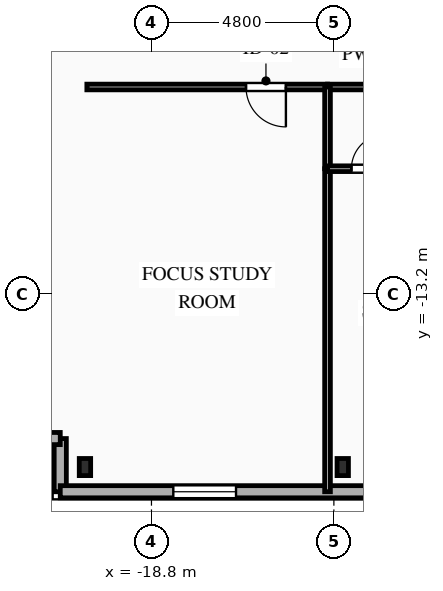
"""IFC4 building model, lengths in metres.
Left out: names, types, materials, properties, quantities, classifications, styles, units other than length and angle.
Written with IfcOpenShell. Run it as: python <this file> out.ifc"""

import sys

from ifc_helpers import new_model, si_unit, direction, frame, frame_2d, origin, origin_2d, place, context, subcontext, project, spatial, rectangle, i_section, extrude, element, fill, save


model = new_model("IFC4")
c1 = context("Model", 3, precision=1e-05, world=origin(), true_north=direction((0.0, 1.0)))
c2 = subcontext(c1, "Body", "Model", "MODEL_VIEW")
j1 = project(units=[si_unit("LENGTHUNIT", "METRE"), si_unit("PLANEANGLEUNIT", "RADIAN")], contexts=[c1])
p1 = place(None, origin())
s1 = spatial("IfcSite", under=j1, at=p1, CompositionType="ELEMENT")
p2 = place(p1, origin())
s2 = spatial("IfcBuilding", under=s1, at=p2, CompositionType="ELEMENT")
p3 = place(p2, frame((0.0, 0.0, 248.4)))
s3 = spatial("IfcBuildingStorey", under=s2, at=p3, CompositionType="ELEMENT", Elevation=248.4)
for number, where, z_axis, x_axis in (
    (1, (-20.55, -17.75, 0.0), (0.0, 0.0, 1.0), (1.0, 0.0, 0.0)),
    (2, (-13.767, -17.75, 0.0), (0.0, 0.0, 1.0), (1.0, 0.0, 0.0)),
):
    element("IfcColumn", number, at=place(p3, frame(where, z_axis=z_axis, x_axis=x_axis)), inside=s3, PredefinedType="COLUMN", context=c2, shape_type="SweptSolid", body=[
        extrude(i_section(OverallWidth=0.3, OverallDepth=0.45, WebThickness=0.014, FlangeThickness=0.026, FilletRadius=0.027, at=origin_2d()), origin(), (0.0, 0.0, 1.0), 3.35),
    ])
p4 = place(p3, frame((-21.2, -18.4, 0.0), z_axis=(0.0, 0.0, 1.0), x_axis=(0.0, 1.0, 0.0)))
e3 = element("IfcWall", 3, at=p4, inside=s3, PredefinedType="SOLIDWALL", context=c2, shape_type="SweptSolid", body=[
    extrude(rectangle(XDim=1.4, YDim=0.32, at=frame_2d((0.7, 0.0))), origin(), (0.0, 0.0, 1.0), 3.04),
])
p5 = place(p3, frame((-21.2, -17.0, 0.0), z_axis=(0.0, 0.0, 1.0), x_axis=(-1.0, 0.0, 0.0)))
e4 = element("IfcWall", 4, at=p5, inside=s3, PredefinedType="SOLIDWALL", context=c2, shape_type="SweptSolid", body=[
    extrude(rectangle(XDim=1.4, YDim=0.32, at=frame_2d((0.7, 0.0))), origin(), (0.0, 0.0, 1.0), 3.04),
])
p6 = place(p3, frame((20.8, -18.4, 0.0), z_axis=(0.0, 0.0, 1.0), x_axis=(-1.0, 0.0, 0.0)))
e5 = element("IfcWall", 5, at=p6, inside=s3, PredefinedType="SOLIDWALL", context=c2, shape_type="SweptSolid", body=[
    extrude(rectangle(XDim=42.0, YDim=0.32, at=frame_2d((21.0, 0.0))), origin(), (0.0, 0.0, 1.0), 3.04),
])
p7 = place(p6, frame((3.255, 0.0, 0.85)))
e6 = element("IfcOpeningElement", 6, at=p7, cuts=e5, PredefinedType="OPENING", context=c2, shape_type="SweptSolid", body=[
    extrude(rectangle(XDim=1.65, YDim=1.85, at=frame_2d((0.825, 0.925))), frame((0.0, 0.17, 0.0), z_axis=(0.0, -1.0, 0.0), x_axis=(1.0, 0.0, 0.0)), (0.0, 0.0, 1.0), 0.34),
])
p8 = place(p6, frame((9.98, 0.0, 0.85)))
e7 = element("IfcOpeningElement", 7, at=p8, cuts=e5, PredefinedType="OPENING", context=c2, shape_type="SweptSolid", body=[
    extrude(rectangle(XDim=2.2, YDim=1.85, at=frame_2d((1.1, 0.925))), frame((0.0, 0.17, 0.0), z_axis=(0.0, -1.0, 0.0), x_axis=(1.0, 0.0, 0.0)), (0.0, 0.0, 1.0), 0.34),
])
p9 = place(p6, frame((16.82, 0.0, 0.85)))
e8 = element("IfcOpeningElement", 8, at=p9, cuts=e5, PredefinedType="OPENING", context=c2, shape_type="SweptSolid", body=[
    extrude(rectangle(XDim=2.2, YDim=1.85, at=frame_2d((1.1, 0.925))), frame((0.0, 0.17, 0.0), z_axis=(0.0, -1.0, 0.0), x_axis=(1.0, 0.0, 0.0)), (0.0, 0.0, 1.0), 0.34),
])
p10 = place(p6, frame((23.66, 0.0, 0.85)))
e9 = element("IfcOpeningElement", 9, at=p10, cuts=e5, PredefinedType="OPENING", context=c2, shape_type="SweptSolid", body=[
    extrude(rectangle(XDim=2.2, YDim=1.85, at=frame_2d((1.1, 0.925))), frame((0.0, 0.17, 0.0), z_axis=(0.0, -1.0, 0.0), x_axis=(1.0, 0.0, 0.0)), (0.0, 0.0, 1.0), 0.34),
])
p11 = place(p6, frame((30.5, 0.0, 0.85)))
e10 = element("IfcOpeningElement", 10, at=p11, cuts=e5, PredefinedType="OPENING", context=c2, shape_type="SweptSolid", body=[
    extrude(rectangle(XDim=2.2, YDim=1.85, at=frame_2d((1.1, 0.925))), frame((0.0, 0.17, 0.0), z_axis=(0.0, -1.0, 0.0), x_axis=(1.0, 0.0, 0.0)), (0.0, 0.0, 1.0), 0.34),
])
p12 = place(p6, frame((37.375, 0.0, 0.85)))
e11 = element("IfcOpeningElement", 11, at=p12, cuts=e5, PredefinedType="OPENING", context=c2, shape_type="SweptSolid", body=[
    extrude(rectangle(XDim=1.65, YDim=1.85, at=frame_2d((0.825, 0.925))), frame((0.0, 0.17, 0.0), z_axis=(0.0, -1.0, 0.0), x_axis=(1.0, 0.0, 0.0)), (0.0, 0.0, 1.0), 0.34),
])
p13 = place(p3, frame((-14.167, -7.75, 0.0), z_axis=(0.0, 0.0, 1.0), x_axis=(-1.0, 0.0, 0.0)))
e12 = element("IfcWall", 12, at=p13, inside=s3, PredefinedType="PARTITIONING", context=c2, shape_type="SweptSolid", body=[
    extrude(rectangle(XDim=6.333, YDim=0.15, at=frame_2d((3.167, 0.0))), origin(), (0.0, 0.0, 1.0), 3.04),
])
p14 = place(p13, frame((1.095, 0.0, 0.0)))
e13 = element("IfcOpeningElement", 13, at=p14, cuts=e12, PredefinedType="OPENING", context=c2, shape_type="SweptSolid", body=[
    extrude(rectangle(XDim=1.05, YDim=2.15, at=frame_2d((0.525, 1.075))), frame((0.0, 0.085, 0.0), z_axis=(0.0, -1.0, 0.0), x_axis=(1.0, 0.0, 0.0)), (0.0, 0.0, 1.0), 0.17),
])
p15 = place(p3, frame((-11.717, -7.75, 0.0), z_axis=(0.0, 0.0, 1.0), x_axis=(-1.0, 0.0, 0.0)))
e14 = element("IfcWall", 14, at=p15, inside=s3, PredefinedType="PLUMBINGWALL", context=c2, shape_type="SweptSolid", body=[
    extrude(rectangle(XDim=2.45, YDim=0.15, at=frame_2d((1.225, 0.0))), origin(), (0.0, 0.0, 1.0), 3.04),
])
p16 = place(p3, frame((-14.167, -9.9, 0.0), z_axis=(0.0, 0.0, 1.0), x_axis=(0.0, -1.0, 0.0)))
e15 = element("IfcWall", 15, at=p16, inside=s3, PredefinedType="PARTITIONING", context=c2, shape_type="SweptSolid", body=[
    extrude(rectangle(XDim=8.5, YDim=0.15, at=frame_2d((4.25, 0.0))), origin(), (0.0, 0.0, 1.0), 3.04),
])
p17 = place(p3, frame((-14.167, -7.75, 0.0), z_axis=(0.0, 0.0, 1.0), x_axis=(0.0, -1.0, 0.0)))
e16 = element("IfcWall", 16, at=p17, inside=s3, PredefinedType="PLUMBINGWALL", context=c2, shape_type="SweptSolid", body=[
    extrude(rectangle(XDim=2.15, YDim=0.15, at=frame_2d((1.075, 0.0))), origin(), (0.0, 0.0, 1.0), 3.04),
])
p18 = place(p3, frame((-14.167, -9.9, 0.0), z_axis=(0.0, 0.0, 1.0), x_axis=(1.0, 0.0, 0.0)))
e17 = element("IfcWall", 17, at=p18, inside=s3, PredefinedType="PLUMBINGWALL", context=c2, shape_type="SweptSolid", body=[
    extrude(rectangle(XDim=2.45, YDim=0.15, at=frame_2d((1.225, 0.0))), origin(), (0.0, 0.0, 1.0), 3.04),
])
p19 = place(p18, frame((0.629, 0.0, 0.0)))
e18 = element("IfcOpeningElement", 18, at=p19, cuts=e17, PredefinedType="OPENING", context=c2, shape_type="SweptSolid", body=[
    extrude(rectangle(XDim=0.9, YDim=2.1, at=frame_2d((0.45, 1.05))), frame((0.0, 0.085, 0.0), z_axis=(0.0, -1.0, 0.0), x_axis=(1.0, 0.0, 0.0)), (0.0, 0.0, 1.0), 0.17),
])
p20 = place(p12, origin())
e19 = element("IfcWindow", 19, at=p20, inside=s3, PartitioningType="SINGLE_PANEL", PredefinedType="WINDOW", context=c2, shape_type="SweptSolid", body=[
    extrude(rectangle(XDim=1.65, YDim=1.85, at=frame_2d((0.825, 0.925))), frame((0.0, 0.03, 0.0), z_axis=(0.0, -1.0, 0.0), x_axis=(1.0, 0.0, 0.0)), (0.0, 0.0, 1.0), 0.06),
])
fill(e11, e19)
p21 = place(p14, origin())
e20 = element("IfcDoor", 20, at=p21, inside=s3, OperationType="SINGLE_SWING_LEFT", PredefinedType="DOOR", context=c2, shape_type="SweptSolid", body=[
    extrude(rectangle(XDim=1.05, YDim=2.15, at=frame_2d((0.525, 1.075))), frame((0.0, 0.025, 0.0), z_axis=(0.0, -1.0, 0.0), x_axis=(1.0, 0.0, 0.0)), (0.0, 0.0, 1.0), 0.05),
])
fill(e13, e20)
p22 = place(p19, origin())
e21 = element("IfcDoor", 21, at=p22, inside=s3, OperationType="SINGLE_SWING_RIGHT", PredefinedType="DOOR", context=c2, shape_type="SweptSolid", body=[
    extrude(rectangle(XDim=0.9, YDim=2.1, at=frame_2d((0.45, 1.05))), frame((0.0, 0.025, 0.0), z_axis=(0.0, -1.0, 0.0), x_axis=(1.0, 0.0, 0.0)), (0.0, 0.0, 1.0), 0.05),
])
fill(e18, e21)
save(model, sys.argv[1])
